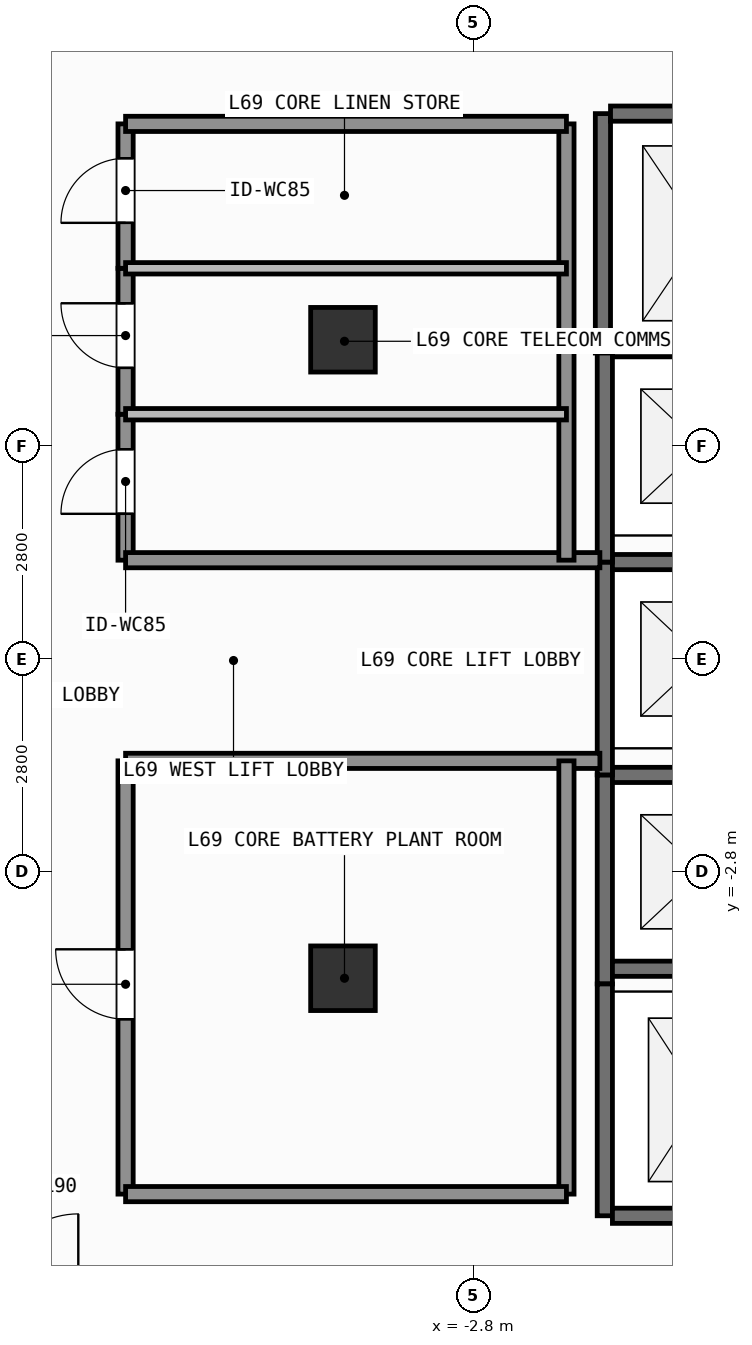
"""IFC4 building model, lengths in metres.
Left out: names, types, materials, properties, quantities, classifications, styles, units other than length and angle.
Written with IfcOpenShell. Run it as: python <this file> out.ifc"""

import sys

from ifc_helpers import new_model, si_unit, direction, frame, frame_2d, origin, origin_2d, place, context, subcontext, project, spatial, rectangle, extrude, element, fill, save


model = new_model("IFC4")
c1 = context("Model", 3, precision=1e-05, world=origin(), true_north=direction((0.0, 1.0)))
c2 = subcontext(c1, "Body", "Model", "MODEL_VIEW")
j1 = project(units=[si_unit("LENGTHUNIT", "METRE"), si_unit("PLANEANGLEUNIT", "RADIAN")], contexts=[c1])
p1 = place(None, origin())
s1 = spatial("IfcSite", under=j1, at=p1, CompositionType="ELEMENT")
p2 = place(p1, origin())
s2 = spatial("IfcBuilding", under=s1, at=p2, CompositionType="ELEMENT")
p3 = place(p2, frame((0.0, 0.0, 282.0)))
s3 = spatial("IfcBuildingStorey", under=s2, at=p3, CompositionType="ELEMENT", Elevation=282.0)
for number, where, z_axis, x_axis in (
    (1, (-4.52, -4.2, 0.0), (0.0, 0.0, 1.0), (1.0, 0.0, 0.0)),
    (2, (-4.52, 4.2, 0.0), (0.0, 0.0, 1.0), (1.0, 0.0, 0.0)),
):
    element("IfcColumn", number, at=place(p3, frame(where, z_axis=z_axis, x_axis=x_axis)), inside=s3, PredefinedType="COLUMN", context=c2, shape_type="SweptSolid", body=[
        extrude(rectangle(XDim=0.85, YDim=0.85, at=origin_2d()), origin(), (0.0, 0.0, 1.0), 3.9),
    ])
p4 = place(p3, frame((-1.075, -4.275, 0.0), z_axis=(0.0, 0.0, 1.0), x_axis=(0.0, 1.0, 0.0)))
e3 = element("IfcWall", 3, at=p4, inside=s3, PredefinedType="SHEAR", context=c2, shape_type="SweptSolid", body=[
    extrude(rectangle(XDim=2.75, YDim=0.2, at=frame_2d((1.375, 0.0))), origin(), (0.0, 0.0, 1.0), 3.62),
])
for number, where, z_axis, x_axis in (
    (4, (-0.975, -4.075, 0.0), (0.0, 0.0, 1.0), (1.0, 0.0, 0.0)),
    (5, (-0.975, -1.525, 0.0), (0.0, 0.0, 1.0), (1.0, 0.0, 0.0)),
):
    element("IfcWall", number, at=place(p3, frame(where, z_axis=z_axis, x_axis=x_axis)), inside=s3, PredefinedType="SHEAR", context=c2, shape_type="SweptSolid", body=[
        extrude(rectangle(XDim=2.35, YDim=0.2, at=frame_2d((1.175, 0.0))), origin(), (0.0, 0.0, 1.0), 3.62),
    ])
p5 = place(p3, frame((-1.075, -1.525, 0.0), z_axis=(0.0, 0.0, 1.0), x_axis=(0.0, 1.0, 0.0)))
e6 = element("IfcWall", 6, at=p5, inside=s3, PredefinedType="SHEAR", context=c2, shape_type="SweptSolid", body=[
    extrude(rectangle(XDim=2.8, YDim=0.2, at=frame_2d((1.4, 0.0))), origin(), (0.0, 0.0, 1.0), 3.62),
])
p6 = place(p3, frame((-0.975, 1.275, 0.0), z_axis=(0.0, 0.0, 1.0), x_axis=(1.0, 0.0, 0.0)))
e7 = element("IfcWall", 7, at=p6, inside=s3, PredefinedType="SHEAR", context=c2, shape_type="SweptSolid", body=[
    extrude(rectangle(XDim=2.35, YDim=0.2, at=frame_2d((1.175, 0.0))), origin(), (0.0, 0.0, 1.0), 3.62),
])
p7 = place(p3, frame((-1.075, 1.275, 0.0), z_axis=(0.0, 0.0, 1.0), x_axis=(0.0, 1.0, 0.0)))
e8 = element("IfcWall", 8, at=p7, inside=s3, PredefinedType="SHEAR", context=c2, shape_type="SweptSolid", body=[
    extrude(rectangle(XDim=2.8, YDim=0.2, at=frame_2d((1.4, 0.0))), origin(), (0.0, 0.0, 1.0), 3.62),
])
p8 = place(p3, frame((-0.975, 4.075, 0.0), z_axis=(0.0, 0.0, 1.0), x_axis=(1.0, 0.0, 0.0)))
e9 = element("IfcWall", 9, at=p8, inside=s3, PredefinedType="SHEAR", context=c2, shape_type="SweptSolid", body=[
    extrude(rectangle(XDim=2.35, YDim=0.2, at=frame_2d((1.175, 0.0))), origin(), (0.0, 0.0, 1.0), 3.62),
])
p9 = place(p3, frame((-1.1, 4.025, 0.0), z_axis=(0.0, 0.0, 1.0), x_axis=(0.0, 1.0, 0.0)))
e10 = element("IfcWall", 10, at=p9, inside=s3, PredefinedType="SHEAR", context=c2, shape_type="SweptSolid", body=[
    extrude(rectangle(XDim=3.15, YDim=0.2, at=frame_2d((1.575, 0.0))), origin(), (0.0, 0.0, 1.0), 3.62),
])
p10 = place(p3, frame((-1.0, 7.175, 0.0), z_axis=(0.0, 0.0, 1.0), x_axis=(1.0, 0.0, 0.0)))
e11 = element("IfcWall", 11, at=p10, inside=s3, PredefinedType="SHEAR", context=c2, shape_type="SweptSolid", body=[
    extrude(rectangle(XDim=2.4, YDim=0.2, at=frame_2d((1.2, 0.0))), origin(), (0.0, 0.0, 1.0), 3.62),
])
p11 = place(p3, frame((-1.075, -7.325, 0.0), z_axis=(0.0, 0.0, 1.0), x_axis=(0.0, 1.0, 0.0)))
e12 = element("IfcWall", 12, at=p11, inside=s3, PredefinedType="SHEAR", context=c2, shape_type="SweptSolid", body=[
    extrude(rectangle(XDim=3.05, YDim=0.2, at=frame_2d((1.525, 0.0))), origin(), (0.0, 0.0, 1.0), 3.62),
])
p12 = place(p3, frame((-0.975, -7.325, 0.0), z_axis=(0.0, 0.0, 1.0), x_axis=(1.0, 0.0, 0.0)))
e13 = element("IfcWall", 13, at=p12, inside=s3, PredefinedType="SHEAR", context=c2, shape_type="SweptSolid", body=[
    extrude(rectangle(XDim=2.35, YDim=0.2, at=frame_2d((1.175, 0.0))), origin(), (0.0, 0.0, 1.0), 3.62),
])
p13 = place(p3, frame((-7.38, -7.04, 0.0), z_axis=(0.0, 0.0, 1.0), x_axis=(0.0, 1.0, 0.0)))
e14 = element("IfcWall", 14, at=p13, inside=s3, PredefinedType="SOLIDWALL", context=c2, shape_type="SweptSolid", body=[
    extrude(rectangle(XDim=5.7, YDim=0.2, at=frame_2d((2.85, 0.0))), origin(), (0.0, 0.0, 1.0), 3.62),
])
p14 = place(p13, frame((2.301, 0.0, 0.0)))
e15 = element("IfcOpeningElement", 15, at=p14, cuts=e14, PredefinedType="OPENING", context=c2, shape_type="SweptSolid", body=[
    extrude(rectangle(XDim=0.92, YDim=2.1, at=frame_2d((0.46, 1.05))), frame((0.0, 0.11, 0.0), z_axis=(0.0, -1.0, 0.0), x_axis=(1.0, 0.0, 0.0)), (0.0, 0.0, 1.0), 0.22),
])
p15 = place(p3, frame((-7.38, 1.3, 0.0), z_axis=(0.0, 0.0, 1.0), x_axis=(0.0, 1.0, 0.0)))
e16 = element("IfcWall", 16, at=p15, inside=s3, PredefinedType="SOLIDWALL", context=c2, shape_type="SweptSolid", body=[
    extrude(rectangle(XDim=1.92, YDim=0.2, at=frame_2d((0.96, 0.0))), origin(), (0.0, 0.0, 1.0), 3.62),
])
p16 = place(p15, frame((0.61, 0.0, 0.0)))
e17 = element("IfcOpeningElement", 17, at=p16, cuts=e16, PredefinedType="OPENING", context=c2, shape_type="SweptSolid", body=[
    extrude(rectangle(XDim=0.85, YDim=2.1, at=frame_2d((0.425, 1.05))), frame((0.0, 0.11, 0.0), z_axis=(0.0, -1.0, 0.0), x_axis=(1.0, 0.0, 0.0)), (0.0, 0.0, 1.0), 0.22),
])
p17 = place(p3, frame((-7.38, 3.22, 0.0), z_axis=(0.0, 0.0, 1.0), x_axis=(0.0, 1.0, 0.0)))
e18 = element("IfcWall", 18, at=p17, inside=s3, PredefinedType="SOLIDWALL", context=c2, shape_type="SweptSolid", body=[
    extrude(rectangle(XDim=1.92, YDim=0.2, at=frame_2d((0.96, 0.0))), origin(), (0.0, 0.0, 1.0), 3.62),
])
p18 = place(p17, frame((0.61, 0.0, 0.0)))
e19 = element("IfcOpeningElement", 19, at=p18, cuts=e18, PredefinedType="OPENING", context=c2, shape_type="SweptSolid", body=[
    extrude(rectangle(XDim=0.85, YDim=2.1, at=frame_2d((0.425, 1.05))), frame((0.0, 0.11, 0.0), z_axis=(0.0, -1.0, 0.0), x_axis=(1.0, 0.0, 0.0)), (0.0, 0.0, 1.0), 0.22),
])
p19 = place(p3, frame((-7.38, 5.14, 0.0), z_axis=(0.0, 0.0, 1.0), x_axis=(0.0, 1.0, 0.0)))
e20 = element("IfcWall", 20, at=p19, inside=s3, PredefinedType="SOLIDWALL", context=c2, shape_type="SweptSolid", body=[
    extrude(rectangle(XDim=1.9, YDim=0.2, at=frame_2d((0.95, 0.0))), origin(), (0.0, 0.0, 1.0), 3.62),
])
p20 = place(p19, frame((0.598, 0.0, 0.0)))
e21 = element("IfcOpeningElement", 21, at=p20, cuts=e20, PredefinedType="OPENING", context=c2, shape_type="SweptSolid", body=[
    extrude(rectangle(XDim=0.85, YDim=2.1, at=frame_2d((0.425, 1.05))), frame((0.0, 0.11, 0.0), z_axis=(0.0, -1.0, 0.0), x_axis=(1.0, 0.0, 0.0)), (0.0, 0.0, 1.0), 0.22),
])
for number, where, z_axis, x_axis in (
    (22, (-7.38, -1.34, 0.0), (0.0, 0.0, 1.0), (1.0, 0.0, 0.0)),
    (23, (-7.38, 1.3, 0.0), (0.0, 0.0, 1.0), (1.0, 0.0, 0.0)),
):
    element("IfcWall", number, at=place(p3, frame(where, z_axis=z_axis, x_axis=x_axis)), inside=s3, PredefinedType="SOLIDWALL", context=c2, shape_type="SweptSolid", body=[
        extrude(rectangle(XDim=6.24, YDim=0.2, at=frame_2d((3.12, 0.0))), origin(), (0.0, 0.0, 1.0), 3.62),
    ])
p21 = place(p3, frame((-1.58, -7.04, 0.0), z_axis=(0.0, 0.0, 1.0), x_axis=(0.0, 1.0, 0.0)))
e24 = element("IfcWall", 24, at=p21, inside=s3, PredefinedType="SOLIDWALL", context=c2, shape_type="SweptSolid", body=[
    extrude(rectangle(XDim=5.7, YDim=0.2, at=frame_2d((2.85, 0.0))), origin(), (0.0, 0.0, 1.0), 3.62),
])
p22 = place(p3, frame((-7.38, -7.04, 0.0), z_axis=(0.0, 0.0, 1.0), x_axis=(1.0, 0.0, 0.0)))
e25 = element("IfcWall", 25, at=p22, inside=s3, PredefinedType="SOLIDWALL", context=c2, shape_type="SweptSolid", body=[
    extrude(rectangle(XDim=5.8, YDim=0.2, at=frame_2d((2.9, 0.0))), origin(), (0.0, 0.0, 1.0), 3.62),
])
p23 = place(p3, frame((-1.58, 1.3, 0.0), z_axis=(0.0, 0.0, 1.0), x_axis=(0.0, 1.0, 0.0)))
e26 = element("IfcWall", 26, at=p23, inside=s3, PredefinedType="SOLIDWALL", context=c2, shape_type="SweptSolid", body=[
    extrude(rectangle(XDim=5.74, YDim=0.2, at=frame_2d((2.87, 0.0))), origin(), (0.0, 0.0, 1.0), 3.62),
])
p24 = place(p3, frame((-7.38, 7.04, 0.0), z_axis=(0.0, 0.0, 1.0), x_axis=(1.0, 0.0, 0.0)))
e27 = element("IfcWall", 27, at=p24, inside=s3, PredefinedType="SOLIDWALL", context=c2, shape_type="SweptSolid", body=[
    extrude(rectangle(XDim=5.8, YDim=0.2, at=frame_2d((2.9, 0.0))), origin(), (0.0, 0.0, 1.0), 3.62),
])
for number, where, z_axis, x_axis in (
    (28, (-7.38, 3.22, 0.0), (0.0, 0.0, 1.0), (1.0, 0.0, 0.0)),
    (29, (-7.38, 5.14, 0.0), (0.0, 0.0, 1.0), (1.0, 0.0, 0.0)),
):
    element("IfcWall", number, at=place(p3, frame(where, z_axis=z_axis, x_axis=x_axis)), inside=s3, PredefinedType="PARTITIONING", context=c2, shape_type="SweptSolid", body=[
        extrude(rectangle(XDim=5.8, YDim=0.15, at=frame_2d((2.9, 0.0))), origin(), (0.0, 0.0, 1.0), 3.62),
    ])
p25 = place(p14, origin())
e30 = element("IfcDoor", 30, at=p25, inside=s3, OperationType="SINGLE_SWING_RIGHT", PredefinedType="DOOR", context=c2, shape_type="SweptSolid", body=[
    extrude(rectangle(XDim=0.92, YDim=2.1, at=frame_2d((0.46, 1.05))), frame((0.0, 0.025, 0.0), z_axis=(0.0, -1.0, 0.0), x_axis=(1.0, 0.0, 0.0)), (0.0, 0.0, 1.0), 0.05),
])
fill(e15, e30)
p26 = place(p16, origin())
e31 = element("IfcDoor", 31, at=p26, inside=s3, OperationType="SINGLE_SWING_LEFT", PredefinedType="DOOR", context=c2, shape_type="SweptSolid", body=[
    extrude(rectangle(XDim=0.85, YDim=2.1, at=frame_2d((0.425, 1.05))), frame((0.0, 0.025, 0.0), z_axis=(0.0, -1.0, 0.0), x_axis=(1.0, 0.0, 0.0)), (0.0, 0.0, 1.0), 0.05),
])
fill(e17, e31)
p27 = place(p18, origin())
e32 = element("IfcDoor", 32, at=p27, inside=s3, OperationType="SINGLE_SWING_RIGHT", PredefinedType="DOOR", context=c2, shape_type="SweptSolid", body=[
    extrude(rectangle(XDim=0.85, YDim=2.1, at=frame_2d((0.425, 1.05))), frame((0.0, 0.025, 0.0), z_axis=(0.0, -1.0, 0.0), x_axis=(1.0, 0.0, 0.0)), (0.0, 0.0, 1.0), 0.05),
])
fill(e19, e32)
p28 = place(p20, origin())
e33 = element("IfcDoor", 33, at=p28, inside=s3, OperationType="SINGLE_SWING_LEFT", PredefinedType="DOOR", context=c2, shape_type="SweptSolid", body=[
    extrude(rectangle(XDim=0.85, YDim=2.1, at=frame_2d((0.425, 1.05))), frame((0.0, 0.025, 0.0), z_axis=(0.0, -1.0, 0.0), x_axis=(1.0, 0.0, 0.0)), (0.0, 0.0, 1.0), 0.05),
])
fill(e21, e33)
save(model, sys.argv[1])
